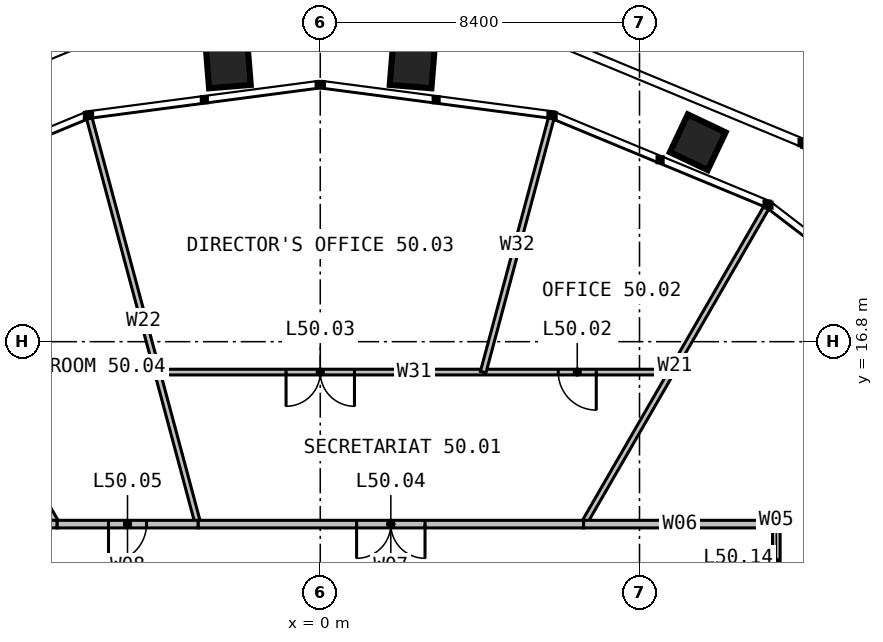
"""IFC4 building model, lengths in metres.
Left out: names, types, materials, properties, quantities, classifications, styles, units other than length and angle.
Written with IfcOpenShell. Run it as: python <this file> out.ifc"""

import sys

from ifc_helpers import new_model, si_unit, direction, frame, frame_2d, origin, place, context, subcontext, project, spatial, rectangle, extrude, element, fill, save


model = new_model("IFC4")
c1 = context("Model", 3, precision=1e-05, world=origin(), true_north=direction((0.0, 1.0)))
c2 = subcontext(c1, "Body", "Model", "MODEL_VIEW")
j1 = project(units=[si_unit("LENGTHUNIT", "METRE"), si_unit("PLANEANGLEUNIT", "RADIAN")], contexts=[c1])
p1 = place(None, origin())
s1 = spatial("IfcSite", under=j1, at=p1, CompositionType="ELEMENT")
p2 = place(p1, origin())
s2 = spatial("IfcBuilding", under=s1, at=p2, CompositionType="ELEMENT")
p3 = place(p2, frame((0.0, 0.0, 207.0)))
s3 = spatial("IfcBuildingStorey", under=s2, at=p3, CompositionType="ELEMENT", Elevation=207.0)
p4 = place(p3, frame((6.928, 12.0, 0.0), z_axis=(0.0, 0.0, 1.0), x_axis=(0.499990471717, 0.866030904871, 0.0)))
e1 = element("IfcWall", 1, at=p4, inside=s3, PredefinedType="PARTITIONING", context=c2, shape_type="SweptSolid", body=[
    extrude(rectangle(XDim=9.62, YDim=0.15, at=frame_2d((4.81, 0.0))), origin(), (0.0, 0.0, 1.0), 2.79),
])
p5 = place(p3, frame((-3.215, 12.0, 0.0), z_axis=(0.0, 0.0, 1.0), x_axis=(-0.258831035528, 0.965922613384, 0.0)))
e2 = element("IfcWall", 2, at=p5, inside=s3, PredefinedType="PARTITIONING", context=c2, shape_type="SweptSolid", body=[
    extrude(rectangle(XDim=11.053, YDim=0.15, at=frame_2d((5.526, 0.0))), origin(), (0.0, 0.0, 1.0), 2.79),
])
p6 = place(p3, frame((-6.928, 12.0, 0.0), z_axis=(0.0, 0.0, 1.0), x_axis=(-0.499990471717, 0.866030904871, 0.0)))
e3 = element("IfcWall", 3, at=p6, inside=s3, PredefinedType="PARTITIONING", context=c2, shape_type="SweptSolid", body=[
    extrude(rectangle(XDim=9.62, YDim=0.15, at=frame_2d((4.81, 0.0))), origin(), (0.0, 0.0, 1.0), 2.79),
])
p7 = place(p3, frame((12.0, 10.0, 0.0), z_axis=(0.0, 0.0, 1.0), x_axis=(0.0, 1.0, 0.0)))
e4 = element("IfcWall", 4, at=p7, inside=s3, PredefinedType="PARTITIONING", context=c2, shape_type="SweptSolid", body=[
    extrude(rectangle(XDim=2.0, YDim=0.2, at=frame_2d((1.0, 0.0))), origin(), (0.0, 0.0, 1.0), 3.8),
])
p8 = place(p3, frame((12.0, 12.0, 0.0), z_axis=(0.0, 0.0, 1.0), x_axis=(-1.0, 0.0, 0.0)))
e5 = element("IfcWall", 5, at=p8, inside=s3, PredefinedType="PARTITIONING", context=c2, shape_type="SweptSolid", body=[
    extrude(rectangle(XDim=5.072, YDim=0.2, at=frame_2d((2.536, 0.0))), origin(), (0.0, 0.0, 1.0), 3.8),
])
p9 = place(p3, frame((9.238, 16.0, 0.0), z_axis=(0.0, 0.0, 1.0), x_axis=(-1.0, 0.0, 0.0)))
e6 = element("IfcWall", 6, at=p9, inside=s3, PredefinedType="PARTITIONING", context=c2, shape_type="SweptSolid", body=[
    extrude(rectangle(XDim=13.525, YDim=0.15, at=frame_2d((6.762, 0.0))), origin(), (0.0, 0.0, 1.0), 2.79),
])
p10 = place(p9, frame((1.975, 0.0, 0.0)))
e7 = element("IfcOpeningElement", 7, at=p10, cuts=e6, PredefinedType="OPENING", context=c2, shape_type="SweptSolid", body=[
    extrude(rectangle(XDim=1.0, YDim=2.2, at=frame_2d((0.5, 1.1))), frame((0.0, 0.085, 0.0), z_axis=(0.0, -1.0, 0.0), x_axis=(1.0, 0.0, 0.0)), (0.0, 0.0, 1.0), 0.17),
])
p11 = place(p9, frame((8.338, 0.0, 0.0)))
e8 = element("IfcOpeningElement", 8, at=p11, cuts=e6, PredefinedType="OPENING", context=c2, shape_type="SweptSolid", body=[
    extrude(rectangle(XDim=1.8, YDim=2.2, at=frame_2d((0.9, 1.1))), frame((0.0, 0.085, 0.0), z_axis=(0.0, -1.0, 0.0), x_axis=(1.0, 0.0, 0.0)), (0.0, 0.0, 1.0), 0.17),
])
p12 = place(p3, frame((4.287, 16.0, 0.0), z_axis=(0.0, 0.0, 1.0), x_axis=(0.258840841621, 0.965919985666, 0.0)))
e9 = element("IfcWall", 9, at=p12, inside=s3, PredefinedType="PARTITIONING", context=c2, shape_type="SweptSolid", body=[
    extrude(rectangle(XDim=6.912, YDim=0.15, at=frame_2d((3.456, 0.0))), origin(), (0.0, 0.0, 1.0), 2.79),
])
p13 = place(p3, frame((6.928, 12.0, 0.0), z_axis=(0.0, 0.0, 1.0), x_axis=(-1.0, 0.0, 0.0)))
e10 = element("IfcWall", 10, at=p13, inside=s3, PredefinedType="PARTITIONING", context=c2, shape_type="SweptSolid", body=[
    extrude(rectangle(XDim=10.144, YDim=0.2, at=frame_2d((5.072, 0.0))), origin(), (0.0, 0.0, 1.0), 3.8),
])
p14 = place(p13, frame((4.172, 0.0, 0.0)))
e11 = element("IfcOpeningElement", 11, at=p14, cuts=e10, PredefinedType="OPENING", context=c2, shape_type="SweptSolid", body=[
    extrude(rectangle(XDim=1.8, YDim=2.2, at=frame_2d((0.9, 1.1))), frame((0.0, 0.11, 0.0), z_axis=(0.0, -1.0, 0.0), x_axis=(1.0, 0.0, 0.0)), (0.0, 0.0, 1.0), 0.22),
])
p15 = place(p3, frame((-3.215, 12.0, 0.0), z_axis=(0.0, 0.0, 1.0), x_axis=(-1.0, 0.0, 0.0)))
e12 = element("IfcWall", 12, at=p15, inside=s3, PredefinedType="PARTITIONING", context=c2, shape_type="SweptSolid", body=[
    extrude(rectangle(XDim=3.713, YDim=0.2, at=frame_2d((1.856, 0.0))), origin(), (0.0, 0.0, 1.0), 3.8),
])
p16 = place(p15, frame((1.356, 0.0, 0.0)))
e13 = element("IfcOpeningElement", 13, at=p16, cuts=e12, PredefinedType="OPENING", context=c2, shape_type="SweptSolid", body=[
    extrude(rectangle(XDim=1.0, YDim=2.2, at=frame_2d((0.5, 1.1))), frame((0.0, 0.11, 0.0), z_axis=(0.0, -1.0, 0.0), x_axis=(1.0, 0.0, 0.0)), (0.0, 0.0, 1.0), 0.22),
])
p17 = place(p3, frame((-6.928, 12.0, 0.0), z_axis=(0.0, 0.0, 1.0), x_axis=(-1.0, 0.0, 0.0)))
e14 = element("IfcWall", 14, at=p17, inside=s3, PredefinedType="PARTITIONING", context=c2, shape_type="SweptSolid", body=[
    extrude(rectangle(XDim=5.072, YDim=0.2, at=frame_2d((2.536, 0.0))), origin(), (0.0, 0.0, 1.0), 3.8),
])
p18 = place(p17, frame((2.036, 0.0, 0.0)))
e15 = element("IfcOpeningElement", 15, at=p18, cuts=e14, PredefinedType="OPENING", context=c2, shape_type="SweptSolid", body=[
    extrude(rectangle(XDim=1.0, YDim=2.2, at=frame_2d((0.5, 1.1))), frame((0.0, 0.11, 0.0), z_axis=(0.0, -1.0, 0.0), x_axis=(1.0, 0.0, 0.0)), (0.0, 0.0, 1.0), 0.22),
])
p19 = place(p10, origin())
e16 = element("IfcDoor", 16, at=p19, inside=s3, OperationType="SINGLE_SWING_LEFT", PredefinedType="DOOR", context=c2, shape_type="SweptSolid", body=[
    extrude(rectangle(XDim=1.0, YDim=2.2, at=frame_2d((0.5, 1.1))), frame((0.0, 0.025, 0.0), z_axis=(0.0, -1.0, 0.0), x_axis=(1.0, 0.0, 0.0)), (0.0, 0.0, 1.0), 0.05),
])
fill(e7, e16)
p20 = place(p11, origin())
e17 = element("IfcDoor", 17, at=p20, inside=s3, OperationType="DOUBLE_DOOR_SINGLE_SWING", PredefinedType="DOOR", context=c2, shape_type="SweptSolid", body=[
    extrude(rectangle(XDim=1.8, YDim=2.2, at=frame_2d((0.9, 1.1))), frame((0.0, 0.025, 0.0), z_axis=(0.0, -1.0, 0.0), x_axis=(1.0, 0.0, 0.0)), (0.0, 0.0, 1.0), 0.05),
])
fill(e8, e17)
p21 = place(p14, origin())
e18 = element("IfcDoor", 18, at=p21, inside=s3, OperationType="DOUBLE_DOOR_SINGLE_SWING", PredefinedType="DOOR", context=c2, shape_type="SweptSolid", body=[
    extrude(rectangle(XDim=1.8, YDim=2.2, at=frame_2d((0.9, 1.1))), frame((0.0, 0.025, 0.0), z_axis=(0.0, -1.0, 0.0), x_axis=(1.0, 0.0, 0.0)), (0.0, 0.0, 1.0), 0.05),
])
fill(e11, e18)
p22 = place(p16, origin())
e19 = element("IfcDoor", 19, at=p22, inside=s3, OperationType="SINGLE_SWING_RIGHT", PredefinedType="DOOR", context=c2, shape_type="SweptSolid", body=[
    extrude(rectangle(XDim=1.0, YDim=2.2, at=frame_2d((0.5, 1.1))), frame((0.0, 0.025, 0.0), z_axis=(0.0, -1.0, 0.0), x_axis=(1.0, 0.0, 0.0)), (0.0, 0.0, 1.0), 0.05),
])
fill(e13, e19)
save(model, sys.argv[1])
